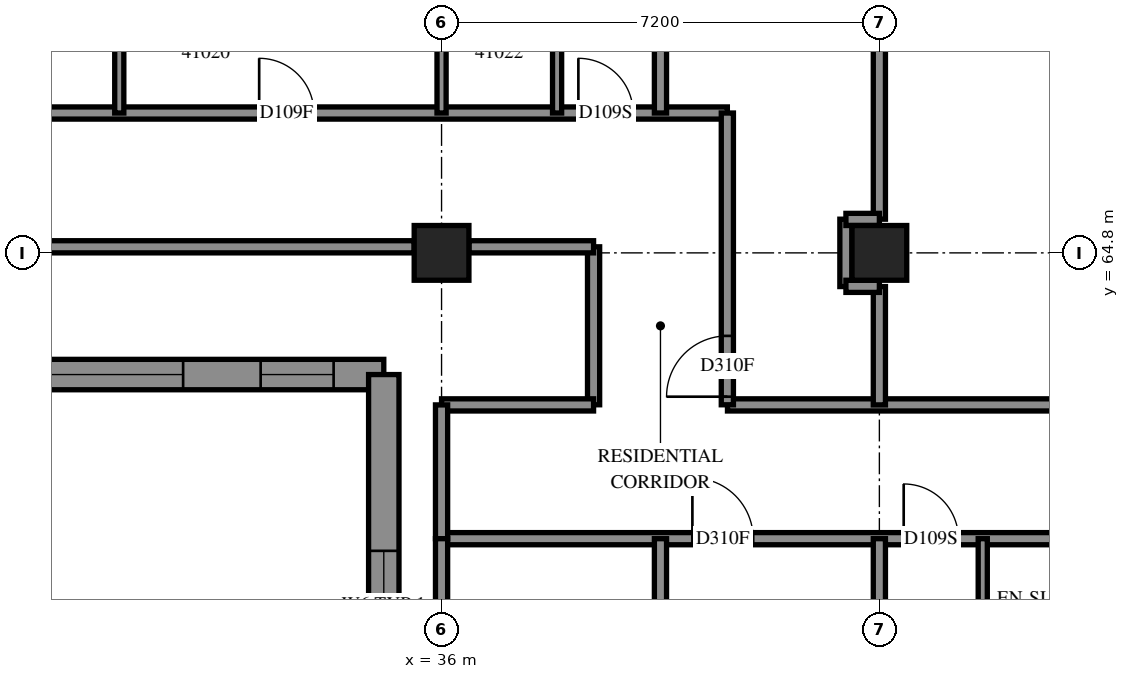
"""IFC4 building model, lengths in metres.
Left out: names, types, materials, properties, quantities, classifications, styles, units other than length and angle.
Written with IfcOpenShell. Run it as: python <this file> out.ifc"""

import sys

from ifc_helpers import new_model, si_unit, direction, frame, frame_2d, origin, origin_2d, place, context, subcontext, project, spatial, polyline, rectangle, outline, extrude, element, fill, save


model = new_model("IFC4")
c1 = context("Model", 3, precision=1e-05, world=origin(), true_north=direction((0.0, 1.0)))
c2 = subcontext(c1, "Body", "Model", "MODEL_VIEW")
j1 = project(units=[si_unit("LENGTHUNIT", "METRE"), si_unit("PLANEANGLEUNIT", "RADIAN")], contexts=[c1])
p1 = place(None, origin())
s1 = spatial("IfcSite", under=j1, at=p1, CompositionType="ELEMENT")
p2 = place(p1, origin())
s2 = spatial("IfcBuilding", under=s1, at=p2, CompositionType="ELEMENT")
p3 = place(p2, frame((0.0, 0.0, 152.4)))
s3 = spatial("IfcBuildingStorey", under=s2, at=p3, CompositionType="ELEMENT", Elevation=152.4)
for number, where, z_axis, x_axis in (
    (1, (36.0, 64.8, 0.0), (0.0, 0.0, 1.0), (1.0, 0.0, 0.0)),
    (2, (43.2, 64.8, 0.0), (0.0, 0.0, 1.0), (1.0, 0.0, 0.0)),
):
    element("IfcColumn", number, at=place(p3, frame(where, z_axis=z_axis, x_axis=x_axis)), inside=s3, PredefinedType="COLUMN", context=c2, shape_type="SweptSolid", body=[
        extrude(rectangle(XDim=0.9, YDim=0.9, at=origin_2d()), origin(), (0.0, 0.0, 1.0), 3.1),
    ])
p4 = place(p3, frame((19.599, 62.799, 0.0), z_axis=(0.0, 0.0, 1.0), x_axis=(1.0, 0.0, 0.0)))
e3 = element("IfcWall", 3, at=p4, inside=s3, PredefinedType="SOLIDWALL", context=c2, shape_type="SweptSolid", body=[
    extrude(outline(polyline([(-0.25, -0.25), (15.201, -0.25), (15.701, 0.25), (0.25, 0.25), (-0.25, -0.25)])), origin(), (0.0, 0.0, 1.0), 3.1),
])
p5 = place(p4, frame((2.401, 0.0, 0.45)))
e4 = element("IfcOpeningElement", 4, at=p5, cuts=e3, PredefinedType="OPENING", context=c2, shape_type="SweptSolid", body=[
    extrude(rectangle(XDim=2.8, YDim=2.5, at=frame_2d((1.4, 1.25))), frame((0.0, 0.26, 0.0), z_axis=(0.0, -1.0, 0.0), x_axis=(1.0, 0.0, 0.0)), (0.0, 0.0, 1.0), 0.52),
])
p6 = place(p4, frame((6.001, 0.0, 0.45)))
e5 = element("IfcOpeningElement", 5, at=p6, cuts=e3, PredefinedType="OPENING", context=c2, shape_type="SweptSolid", body=[
    extrude(rectangle(XDim=2.8, YDim=2.5, at=frame_2d((1.4, 1.25))), frame((0.0, 0.26, 0.0), z_axis=(0.0, -1.0, 0.0), x_axis=(1.0, 0.0, 0.0)), (0.0, 0.0, 1.0), 0.52),
])
p7 = place(p4, frame((9.351, 0.0, 0.45)))
e6 = element("IfcOpeningElement", 6, at=p7, cuts=e3, PredefinedType="OPENING", context=c2, shape_type="SweptSolid", body=[
    extrude(rectangle(XDim=2.8, YDim=2.5, at=frame_2d((1.4, 1.25))), frame((0.0, 0.26, 0.0), z_axis=(0.0, -1.0, 0.0), x_axis=(1.0, 0.0, 0.0)), (0.0, 0.0, 1.0), 0.52),
])
p8 = place(p4, frame((0.625, 0.0, 0.45)))
e7 = element("IfcOpeningElement", 7, at=p8, cuts=e3, PredefinedType="OPENING", context=c2, shape_type="SweptSolid", body=[
    extrude(rectangle(XDim=1.2, YDim=2.5, at=frame_2d((0.6, 1.25))), frame((0.0, 0.26, 0.0), z_axis=(0.0, -1.0, 0.0), x_axis=(1.0, 0.0, 0.0)), (0.0, 0.0, 1.0), 0.52),
])
p9 = place(p4, frame((13.426, 0.0, 0.45)))
e8 = element("IfcOpeningElement", 8, at=p9, cuts=e3, PredefinedType="OPENING", context=c2, shape_type="SweptSolid", body=[
    extrude(rectangle(XDim=1.2, YDim=2.5, at=frame_2d((0.6, 1.25))), frame((0.0, 0.26, 0.0), z_axis=(0.0, -1.0, 0.0), x_axis=(1.0, 0.0, 0.0)), (0.0, 0.0, 1.0), 0.52),
])
p10 = place(p3, frame((35.05, 62.799, 0.0), z_axis=(0.0, 0.0, 1.0), x_axis=(0.0, -1.0, 0.0)))
e9 = element("IfcWall", 9, at=p10, inside=s3, PredefinedType="SOLIDWALL", context=c2, shape_type="SweptSolid", body=[
    extrude(outline(polyline([(0.25, -0.25), (6.399, -0.25), (5.899, 0.25), (-0.25, 0.25), (0.25, -0.25)])), origin(), (0.0, 0.0, 1.0), 3.1),
])
p11 = place(p10, frame((2.899, 0.0, 0.7)))
e10 = element("IfcOpeningElement", 10, at=p11, cuts=e9, PredefinedType="OPENING", context=c2, shape_type="SweptSolid", body=[
    extrude(rectangle(XDim=1.8, YDim=2.2, at=frame_2d((0.9, 1.1))), frame((0.0, 0.26, 0.0), z_axis=(0.0, -1.0, 0.0), x_axis=(1.0, 0.0, 0.0)), (0.0, 0.0, 1.0), 0.52),
])
p12 = place(p3, frame((21.602, 67.1, 0.0), z_axis=(0.0, 0.0, 1.0), x_axis=(1.0, 0.0, 0.0)))
e11 = element("IfcWall", 11, at=p12, inside=s3, PredefinedType="PARTITIONING", context=c2, shape_type="SweptSolid", body=[
    extrude(rectangle(XDim=19.098, YDim=0.2, at=frame_2d((9.549, 0.0))), origin(), (0.0, 0.0, 1.0), 3.1),
])
p13 = place(p12, frame((3.998, 0.0, 0.0)))
e12 = element("IfcOpeningElement", 12, at=p13, cuts=e11, PredefinedType="OPENING", context=c2, shape_type="SweptSolid", body=[
    extrude(rectangle(XDim=0.9, YDim=2.1, at=frame_2d((0.45, 1.05))), frame((0.0, 0.11, 0.0), z_axis=(0.0, -1.0, 0.0), x_axis=(1.0, 0.0, 0.0)), (0.0, 0.0, 1.0), 0.22),
])
p14 = place(p12, frame((11.399, 0.0, 0.0)))
e13 = element("IfcOpeningElement", 13, at=p14, cuts=e11, PredefinedType="OPENING", context=c2, shape_type="SweptSolid", body=[
    extrude(rectangle(XDim=0.9, YDim=2.1, at=frame_2d((0.45, 1.05))), frame((0.0, 0.11, 0.0), z_axis=(0.0, -1.0, 0.0), x_axis=(1.0, 0.0, 0.0)), (0.0, 0.0, 1.0), 0.22),
])
p15 = place(p12, frame((16.648, 0.0, 0.0)))
e14 = element("IfcOpeningElement", 14, at=p15, cuts=e11, PredefinedType="OPENING", context=c2, shape_type="SweptSolid", body=[
    extrude(rectangle(XDim=0.9, YDim=2.1, at=frame_2d((0.45, 1.05))), frame((0.0, 0.11, 0.0), z_axis=(0.0, -1.0, 0.0), x_axis=(1.0, 0.0, 0.0)), (0.0, 0.0, 1.0), 0.22),
])
p16 = place(p3, frame((36.0, 60.1, 0.0), z_axis=(0.0, 0.0, 1.0), x_axis=(1.0, 0.0, 0.0)))
e15 = element("IfcWall", 15, at=p16, inside=s3, PredefinedType="PARTITIONING", context=c2, shape_type="SweptSolid", body=[
    extrude(rectangle(XDim=16.9, YDim=0.2, at=frame_2d((8.45, 0.0))), origin(), (0.0, 0.0, 1.0), 3.1),
])
p17 = place(p16, frame((4.125, 0.0, 0.0)))
e16 = element("IfcOpeningElement", 16, at=p17, cuts=e15, PredefinedType="OPENING", context=c2, shape_type="SweptSolid", body=[
    extrude(rectangle(XDim=1.0, YDim=2.1, at=frame_2d((0.5, 1.05))), frame((0.0, 0.11, 0.0), z_axis=(0.0, -1.0, 0.0), x_axis=(1.0, 0.0, 0.0)), (0.0, 0.0, 1.0), 0.22),
])
p18 = place(p16, frame((7.6, 0.0, 0.0)))
e17 = element("IfcOpeningElement", 17, at=p18, cuts=e15, PredefinedType="OPENING", context=c2, shape_type="SweptSolid", body=[
    extrude(rectangle(XDim=0.9, YDim=2.1, at=frame_2d((0.45, 1.05))), frame((0.0, 0.11, 0.0), z_axis=(0.0, -1.0, 0.0), x_axis=(1.0, 0.0, 0.0)), (0.0, 0.0, 1.0), 0.22),
])
p19 = place(p16, frame((11.635, 0.0, 0.0)))
e18 = element("IfcOpeningElement", 18, at=p19, cuts=e15, PredefinedType="OPENING", context=c2, shape_type="SweptSolid", body=[
    extrude(rectangle(XDim=1.0, YDim=2.1, at=frame_2d((0.5, 1.05))), frame((0.0, 0.11, 0.0), z_axis=(0.0, -1.0, 0.0), x_axis=(1.0, 0.0, 0.0)), (0.0, 0.0, 1.0), 0.22),
])
p20 = place(p16, frame((15.652, 0.0, 0.0)))
e19 = element("IfcOpeningElement", 19, at=p20, cuts=e15, PredefinedType="OPENING", context=c2, shape_type="SweptSolid", body=[
    extrude(rectangle(XDim=1.0, YDim=2.1, at=frame_2d((0.5, 1.05))), frame((0.0, 0.11, 0.0), z_axis=(0.0, -1.0, 0.0), x_axis=(1.0, 0.0, 0.0)), (0.0, 0.0, 1.0), 0.22),
])
p21 = place(p3, frame((40.702, 62.3, 0.0), z_axis=(0.0, 0.0, 1.0), x_axis=(1.0, 0.0, 0.0)))
e20 = element("IfcWall", 20, at=p21, inside=s3, PredefinedType="PARTITIONING", context=c2, shape_type="SweptSolid", body=[
    extrude(rectangle(XDim=9.698, YDim=0.2, at=frame_2d((4.849, 0.0))), origin(), (0.0, 0.0, 1.0), 3.1),
])
p22 = place(p21, frame((6.198, 0.0, 0.0)))
e21 = element("IfcOpeningElement", 21, at=p22, cuts=e20, PredefinedType="OPENING", context=c2, shape_type="SweptSolid", body=[
    extrude(rectangle(XDim=1.0, YDim=2.1, at=frame_2d((0.5, 1.05))), frame((0.0, 0.11, 0.0), z_axis=(0.0, -1.0, 0.0), x_axis=(1.0, 0.0, 0.0)), (0.0, 0.0, 1.0), 0.22),
])
p23 = place(p3, frame((29.25, 64.9, 0.0), z_axis=(0.0, 0.0, 1.0), x_axis=(1.0, 0.0, 0.0)))
e22 = element("IfcWall", 22, at=p23, inside=s3, PredefinedType="PARTITIONING", context=c2, shape_type="SweptSolid", body=[
    extrude(rectangle(XDim=6.3, YDim=0.2, at=frame_2d((3.15, 0.0))), origin(), (0.0, 0.0, 1.0), 2.6),
])
p24 = place(p3, frame((43.2, 65.354, 0.0), z_axis=(0.0, 0.0, 1.0), x_axis=(0.0, 1.0, 0.0)))
e23 = element("IfcWall", 23, at=p24, inside=s3, PredefinedType="PARTITIONING", context=c2, shape_type="SweptSolid", body=[
    extrude(rectangle(XDim=6.092, YDim=0.2, at=frame_2d((3.046, 0.0))), origin(), (0.0, 0.0, 1.0), 3.1),
])
p25 = place(p3, frame((39.6, 67.1, 0.0), z_axis=(0.0, 0.0, 1.0), x_axis=(0.0, 1.0, 0.0)))
e24 = element("IfcWall", 24, at=p25, inside=s3, PredefinedType="PARTITIONING", context=c2, shape_type="SweptSolid", body=[
    extrude(rectangle(XDim=5.746, YDim=0.2, at=frame_2d((2.873, 0.0))), origin(), (0.0, 0.0, 1.0), 3.1),
])
p26 = place(p3, frame((40.7, 62.302, 0.0), z_axis=(0.0, 0.0, 1.0), x_axis=(0.0, 1.0, 0.0)))
e25 = element("IfcWall", 25, at=p26, inside=s3, PredefinedType="PARTITIONING", context=c2, shape_type="SweptSolid", body=[
    extrude(rectangle(XDim=4.798, YDim=0.2, at=frame_2d((2.399, 0.0))), origin(), (0.0, 0.0, 1.0), 3.1),
])
p27 = place(p26, frame((0.133, 0.0, 0.0)))
e26 = element("IfcOpeningElement", 26, at=p27, cuts=e25, PredefinedType="OPENING", context=c2, shape_type="SweptSolid", body=[
    extrude(rectangle(XDim=1.0, YDim=2.1, at=frame_2d((0.5, 1.05))), frame((0.0, 0.11, 0.0), z_axis=(0.0, -1.0, 0.0), x_axis=(1.0, 0.0, 0.0)), (0.0, 0.0, 1.0), 0.22),
])
p28 = place(p3, frame((39.6, 56.9, 0.0), z_axis=(0.0, 0.0, 1.0), x_axis=(0.0, 1.0, 0.0)))
e27 = element("IfcWall", 27, at=p28, inside=s3, PredefinedType="PARTITIONING", context=c2, shape_type="SweptSolid", body=[
    extrude(rectangle(XDim=3.2, YDim=0.2, at=frame_2d((1.6, 0.0))), origin(), (0.0, 0.0, 1.0), 3.1),
])
p29 = place(p3, frame((38.5, 62.302, 0.0), z_axis=(0.0, 0.0, 1.0), x_axis=(0.0, 1.0, 0.0)))
e28 = element("IfcWall", 28, at=p29, inside=s3, PredefinedType="PARTITIONING", context=c2, shape_type="SweptSolid", body=[
    extrude(rectangle(XDim=2.598, YDim=0.2, at=frame_2d((1.299, 0.0))), origin(), (0.0, 0.0, 1.0), 3.1),
])
p30 = place(p3, frame((36.0, 62.3, 0.0), z_axis=(0.0, 0.0, 1.0), x_axis=(1.0, 0.0, 0.0)))
e29 = element("IfcWall", 29, at=p30, inside=s3, PredefinedType="PARTITIONING", context=c2, shape_type="SweptSolid", body=[
    extrude(rectangle(XDim=2.5, YDim=0.2, at=frame_2d((1.25, 0.0))), origin(), (0.0, 0.0, 1.0), 3.1),
])
for number, where, z_axis, x_axis in (
    (30, (30.7, 67.1, 0.0), (0.0, 0.0, 1.0), (0.0, 1.0, 0.0)),
    (31, (36.0, 67.1, 0.0), (0.0, 0.0, 1.0), (0.0, 1.0, 0.0)),
    (32, (37.9, 67.1, 0.0), (0.0, 0.0, 1.0), (0.0, 1.0, 0.0)),
    (33, (44.9, 57.7, 0.0), (0.0, 0.0, 1.0), (0.0, 1.0, 0.0)),
):
    element("IfcWall", number, at=place(p3, frame(where, z_axis=z_axis, x_axis=x_axis)), inside=s3, PredefinedType="PARTITIONING", context=c2, shape_type="SweptSolid", body=[
        extrude(rectangle(XDim=2.4, YDim=0.15, at=frame_2d((1.2, 0.0))), origin(), (0.0, 0.0, 1.0), 3.1),
    ])
p31 = place(p3, frame((36.0, 60.1, 0.0), z_axis=(0.0, 0.0, 1.0), x_axis=(0.0, 1.0, 0.0)))
e34 = element("IfcWall", 34, at=p31, inside=s3, PredefinedType="PARTITIONING", context=c2, shape_type="SweptSolid", body=[
    extrude(rectangle(XDim=2.2, YDim=0.2, at=frame_2d((1.1, 0.0))), origin(), (0.0, 0.0, 1.0), 2.6),
])
p32 = place(p3, frame((36.0, 58.05, 0.0), z_axis=(0.0, 0.0, 1.0), x_axis=(0.0, 1.0, 0.0)))
e35 = element("IfcWall", 35, at=p32, inside=s3, PredefinedType="PARTITIONING", context=c2, shape_type="SweptSolid", body=[
    extrude(rectangle(XDim=2.05, YDim=0.2, at=frame_2d((1.025, 0.0))), origin(), (0.0, 0.0, 1.0), 2.6),
])
for number, where, z_axis, x_axis in (
    (36, (43.2, 58.05, 0.0), (0.0, 0.0, 1.0), (0.0, 1.0, 0.0)),
    (37, (36.45, 64.9, 0.0), (0.0, 0.0, 1.0), (1.0, 0.0, 0.0)),
):
    element("IfcWall", number, at=place(p3, frame(where, z_axis=z_axis, x_axis=x_axis)), inside=s3, PredefinedType="PARTITIONING", context=c2, shape_type="SweptSolid", body=[
        extrude(rectangle(XDim=2.05, YDim=0.2, at=frame_2d((1.025, 0.0))), origin(), (0.0, 0.0, 1.0), 3.1),
    ])
p33 = place(p3, frame((43.2, 62.3, 0.0), z_axis=(0.0, 0.0, 1.0), x_axis=(0.0, 1.0, 0.0)))
e38 = element("IfcWall", 38, at=p33, inside=s3, PredefinedType="PARTITIONING", context=c2, shape_type="SweptSolid", body=[
    extrude(rectangle(XDim=1.946, YDim=0.2, at=frame_2d((0.973, 0.0))), origin(), (0.0, 0.0, 1.0), 3.1),
])
p34 = place(p3, frame((42.65, 64.246, 0.0), z_axis=(0.0, 0.0, 1.0), x_axis=(0.0, 1.0, 0.0)))
e39 = element("IfcWall", 39, at=p34, inside=s3, PredefinedType="PARTITIONING", context=c2, shape_type="SweptSolid", body=[
    extrude(rectangle(XDim=1.108, YDim=0.2, at=frame_2d((0.554, 0.0))), origin(), (0.0, 0.0, 1.0), 3.1),
])
for number, where, z_axis, x_axis in (
    (40, (42.65, 65.35, 0.0), (0.0, 0.0, 1.0), (1.0, 0.0, 0.0)),
    (41, (42.65, 64.25, 0.0), (0.0, 0.0, 1.0), (1.0, 0.0, 0.0)),
):
    element("IfcWall", number, at=place(p3, frame(where, z_axis=z_axis, x_axis=x_axis)), inside=s3, PredefinedType="PARTITIONING", context=c2, shape_type="SweptSolid", body=[
        extrude(rectangle(XDim=0.55, YDim=0.2, at=frame_2d((0.275, 0.0))), origin(), (0.0, 0.0, 1.0), 3.1),
    ])
p35 = place(p7, origin())
e42 = element("IfcWindow", 42, at=p35, inside=s3, PartitioningType="SINGLE_PANEL", PredefinedType="WINDOW", context=c2, shape_type="SweptSolid", body=[
    extrude(rectangle(XDim=2.8, YDim=2.5, at=frame_2d((1.4, 1.25))), frame((0.0, 0.18, 0.0), z_axis=(0.0, -1.0, 0.0), x_axis=(1.0, 0.0, 0.0)), (0.0, 0.0, 1.0), 0.06),
])
fill(e6, e42)
p36 = place(p9, origin())
e43 = element("IfcWindow", 43, at=p36, inside=s3, PartitioningType="SINGLE_PANEL", PredefinedType="WINDOW", context=c2, shape_type="SweptSolid", body=[
    extrude(rectangle(XDim=1.2, YDim=2.5, at=frame_2d((0.6, 1.25))), frame((0.0, 0.18, 0.0), z_axis=(0.0, -1.0, 0.0), x_axis=(1.0, 0.0, 0.0)), (0.0, 0.0, 1.0), 0.06),
])
fill(e8, e43)
p37 = place(p14, origin())
e44 = element("IfcDoor", 44, at=p37, inside=s3, OperationType="SINGLE_SWING_RIGHT", PredefinedType="DOOR", context=c2, shape_type="SweptSolid", body=[
    extrude(rectangle(XDim=0.9, YDim=2.1, at=frame_2d((0.45, 1.05))), frame((0.0, 0.025, 0.0), z_axis=(0.0, -1.0, 0.0), x_axis=(1.0, 0.0, 0.0)), (0.0, 0.0, 1.0), 0.05),
])
fill(e13, e44)
p38 = place(p15, origin())
e45 = element("IfcDoor", 45, at=p38, inside=s3, OperationType="SINGLE_SWING_RIGHT", PredefinedType="DOOR", context=c2, shape_type="SweptSolid", body=[
    extrude(rectangle(XDim=0.9, YDim=2.1, at=frame_2d((0.45, 1.05))), frame((0.0, 0.025, 0.0), z_axis=(0.0, -1.0, 0.0), x_axis=(1.0, 0.0, 0.0)), (0.0, 0.0, 1.0), 0.05),
])
fill(e14, e45)
p39 = place(p17, origin())
e46 = element("IfcDoor", 46, at=p39, inside=s3, OperationType="SINGLE_SWING_RIGHT", PredefinedType="DOOR", context=c2, shape_type="SweptSolid", body=[
    extrude(rectangle(XDim=1.0, YDim=2.1, at=frame_2d((0.5, 1.05))), frame((0.0, 0.025, 0.0), z_axis=(0.0, -1.0, 0.0), x_axis=(1.0, 0.0, 0.0)), (0.0, 0.0, 1.0), 0.05),
])
fill(e16, e46)
p40 = place(p18, origin())
e47 = element("IfcDoor", 47, at=p40, inside=s3, OperationType="SINGLE_SWING_LEFT", PredefinedType="DOOR", context=c2, shape_type="SweptSolid", body=[
    extrude(rectangle(XDim=0.9, YDim=2.1, at=frame_2d((0.45, 1.05))), frame((0.0, 0.025, 0.0), z_axis=(0.0, -1.0, 0.0), x_axis=(1.0, 0.0, 0.0)), (0.0, 0.0, 1.0), 0.05),
])
fill(e17, e47)
p41 = place(p27, origin())
e48 = element("IfcDoor", 48, at=p41, inside=s3, OperationType="SINGLE_SWING_LEFT", PredefinedType="DOOR", context=c2, shape_type="SweptSolid", body=[
    extrude(rectangle(XDim=1.0, YDim=2.1, at=frame_2d((0.5, 1.05))), frame((0.0, 0.025, 0.0), z_axis=(0.0, -1.0, 0.0), x_axis=(1.0, 0.0, 0.0)), (0.0, 0.0, 1.0), 0.05),
])
fill(e26, e48)
p42 = place(p11, origin())
e49 = element("IfcWindow", 49, at=p42, inside=s3, PartitioningType="SINGLE_PANEL", PredefinedType="WINDOW", context=c2, shape_type="SweptSolid", body=[
    extrude(rectangle(XDim=1.8, YDim=2.2, at=frame_2d((0.9, 1.1))), frame((0.0, 0.18, 0.0), z_axis=(0.0, -1.0, 0.0), x_axis=(1.0, 0.0, 0.0)), (0.0, 0.0, 1.0), 0.06),
])
fill(e10, e49)
save(model, sys.argv[1])
